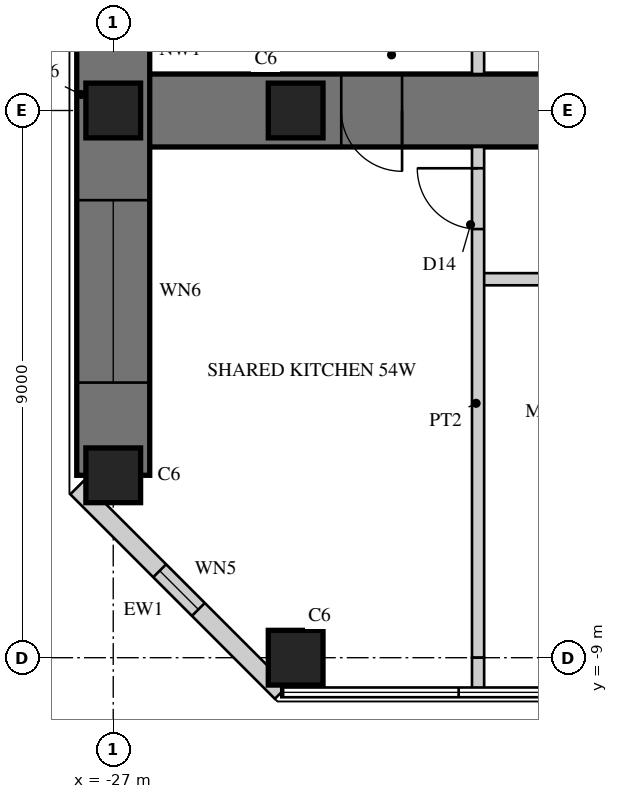
"""IFC4 building model, lengths in metres.
Left out: names, types, materials, properties, quantities, classifications, styles, units other than length and angle.
Written with IfcOpenShell. Run it as: python <this file> out.ifc"""

import sys

from ifc_helpers import new_model, si_unit, direction, frame, frame_2d, origin, origin_2d, place, context, subcontext, project, spatial, rectangle, hollow_rectangle, extrude, element, fill, save


model = new_model("IFC4")
c1 = context("Model", 3, precision=1e-05, world=origin(), true_north=direction((0.0, 1.0)))
c2 = subcontext(c1, "Body", "Model", "MODEL_VIEW")
j1 = project(units=[si_unit("LENGTHUNIT", "METRE"), si_unit("PLANEANGLEUNIT", "RADIAN")], contexts=[c1])
p1 = place(None, origin())
s1 = spatial("IfcSite", under=j1, at=p1, CompositionType="ELEMENT")
p2 = place(p1, origin())
s2 = spatial("IfcBuilding", under=s1, at=p2, CompositionType="ELEMENT")
p3 = place(p2, frame((0.0, 0.0, 213.7)))
s3 = spatial("IfcBuildingStorey", under=s2, at=p3, CompositionType="ELEMENT", Elevation=213.7)
p4 = place(p3, frame((-9.0, 0.0, 0.0), z_axis=(0.0, 0.0, 1.0), x_axis=(-1.0, 0.0, 0.0)))
e1 = element("IfcWall", 1, at=p4, inside=s3, PredefinedType="SHEAR", context=c2, shape_type="SweptSolid", body=[
    extrude(rectangle(XDim=18.0, YDim=1.2, at=frame_2d((9.0, 0.0))), origin(), (0.0, 0.0, 1.0), 3.4),
])
p5 = place(p4, frame((3.95, 0.0, 0.0)))
e2 = element("IfcOpeningElement", 2, at=p5, cuts=e1, PredefinedType="OPENING", context=c2, shape_type="SweptSolid", body=[
    extrude(rectangle(XDim=1.0, YDim=2.15, at=frame_2d((0.5, 1.075))), frame((0.0, 0.61, 0.0), z_axis=(0.0, -1.0, 0.0), x_axis=(1.0, 0.0, 0.0)), (0.0, 0.0, 1.0), 1.22),
])
p6 = place(p4, frame((6.6, 0.0, 0.0)))
e3 = element("IfcOpeningElement", 3, at=p6, cuts=e1, PredefinedType="OPENING", context=c2, shape_type="SweptSolid", body=[
    extrude(rectangle(XDim=1.0, YDim=2.15, at=frame_2d((0.5, 1.075))), frame((0.0, 0.61, 0.0), z_axis=(0.0, -1.0, 0.0), x_axis=(1.0, 0.0, 0.0)), (0.0, 0.0, 1.0), 1.22),
])
p7 = place(p4, frame((13.25, 0.0, 0.0)))
e4 = element("IfcOpeningElement", 4, at=p7, cuts=e1, PredefinedType="OPENING", context=c2, shape_type="SweptSolid", body=[
    extrude(rectangle(XDim=1.0, YDim=2.0, at=frame_2d((0.5, 1.0))), frame((0.0, 0.61, 0.0), z_axis=(0.0, -1.0, 0.0), x_axis=(1.0, 0.0, 0.0)), (0.0, 0.0, 1.0), 1.22),
])
p8 = place(p3, frame((-27.0, 6.0, 0.0), z_axis=(0.0, 0.0, 1.0), x_axis=(0.0, -1.0, 0.0)))
e5 = element("IfcWall", 5, at=p8, inside=s3, PredefinedType="SHEAR", context=c2, shape_type="SweptSolid", body=[
    extrude(rectangle(XDim=12.0, YDim=1.2, at=frame_2d((6.0, 0.0))), origin(), (0.0, 0.0, 1.0), 3.4),
])
p9 = place(p8, frame((1.525, 0.0, 0.6)))
e6 = element("IfcOpeningElement", 6, at=p9, cuts=e5, PredefinedType="OPENING", context=c2, shape_type="SweptSolid", body=[
    extrude(rectangle(XDim=3.0, YDim=2.4, at=frame_2d((1.5, 1.2))), frame((0.0, 0.61, 0.0), z_axis=(0.0, -1.0, 0.0), x_axis=(1.0, 0.0, 0.0)), (0.0, 0.0, 1.0), 1.22),
])
p10 = place(p8, frame((7.475, 0.0, 0.6)))
e7 = element("IfcOpeningElement", 7, at=p10, cuts=e5, PredefinedType="OPENING", context=c2, shape_type="SweptSolid", body=[
    extrude(rectangle(XDim=3.0, YDim=2.4, at=frame_2d((1.5, 1.2))), frame((0.0, 0.61, 0.0), z_axis=(0.0, -1.0, 0.0), x_axis=(1.0, 0.0, 0.0)), (0.0, 0.0, 1.0), 1.22),
])
for number, where, z_axis, x_axis in (
    (8, (-24.0, -9.0, 0.0), (0.0, 0.0, 1.0), (1.0, 0.0, 0.0)),
    (9, (-27.0, 0.0, 0.0), (0.0, 0.0, 1.0), (1.0, 0.0, 0.0)),
    (10, (-27.0, -6.0, 0.0), (0.0, 0.0, 1.0), (1.0, 0.0, 0.0)),
    (11, (-24.0, 0.0, 0.0), (0.0, 0.0, 1.0), (1.0, 0.0, 0.0)),
):
    element("IfcColumn", number, at=place(p3, frame(where, z_axis=z_axis, x_axis=x_axis)), inside=s3, PredefinedType="COLUMN", context=c2, shape_type="SweptSolid", body=[
        extrude(rectangle(XDim=0.9, YDim=0.9, at=origin_2d()), origin(), (0.0, 0.0, 1.0), 3.4),
    ])
p11 = place(p3, frame((-27.6, -6.206, 0.0), z_axis=(0.0, 0.0, 1.0), x_axis=(0.707106781187, -0.707106781187, 0.0)))
e12 = element("IfcWall", 12, at=p11, inside=s3, PredefinedType="SOLIDWALL", context=c2, shape_type="SweptSolid", body=[
    extrude(rectangle(XDim=4.757, YDim=0.3, at=frame_2d((2.379, 0.0))), origin(), (0.0, 0.0, 1.0), 3.15),
])
p12 = place(p11, frame((1.929, 0.0, 0.3)))
e13 = element("IfcOpeningElement", 13, at=p12, cuts=e12, PredefinedType="OPENING", context=c2, shape_type="SweptSolid", body=[
    extrude(rectangle(XDim=0.9, YDim=2.4, at=frame_2d((0.45, 1.2))), frame((0.0, 0.16, 0.0), z_axis=(0.0, -1.0, 0.0), x_axis=(1.0, 0.0, 0.0)), (0.0, 0.0, 1.0), 0.32),
])
p13 = place(p3, frame((-9.55, -2.775, 0.0), z_axis=(0.0, 0.0, 1.0), x_axis=(-1.0, 0.0, 0.0)))
e14 = element("IfcWall", 14, at=p13, inside=s3, PredefinedType="SOLIDWALL", context=c2, shape_type="SweptSolid", body=[
    extrude(rectangle(XDim=11.45, YDim=0.2, at=frame_2d((5.725, 0.0))), origin(), (0.0, 0.0, 1.0), 3.15),
])
p14 = place(p13, frame((3.4, 0.0, 0.0)))
e15 = element("IfcOpeningElement", 15, at=p14, cuts=e14, PredefinedType="OPENING", context=c2, shape_type="SweptSolid", body=[
    extrude(rectangle(XDim=1.0, YDim=2.15, at=frame_2d((0.5, 1.075))), frame((0.0, 0.11, 0.0), z_axis=(0.0, -1.0, 0.0), x_axis=(1.0, 0.0, 0.0)), (0.0, 0.0, 1.0), 0.22),
])
p15 = place(p13, frame((6.65, 0.0, 0.0)))
e16 = element("IfcOpeningElement", 16, at=p15, cuts=e14, PredefinedType="OPENING", context=c2, shape_type="SweptSolid", body=[
    extrude(rectangle(XDim=1.0, YDim=2.2, at=frame_2d((0.5, 1.1))), frame((0.0, 0.11, 0.0), z_axis=(0.0, -1.0, 0.0), x_axis=(1.0, 0.0, 0.0)), (0.0, 0.0, 1.0), 0.22),
])
p16 = place(p3, frame((-21.0, 9.0, 0.0), z_axis=(0.0, 0.0, 1.0), x_axis=(0.0, -1.0, 0.0)))
e17 = element("IfcWall", 17, at=p16, inside=s3, PredefinedType="SOLIDWALL", context=c2, shape_type="SweptSolid", body=[
    extrude(rectangle(XDim=8.4, YDim=0.2, at=frame_2d((4.2, 0.0))), origin(), (0.0, 0.0, 1.0), 2.3),
])
p17 = place(p3, frame((-21.0, -0.6, 0.0), z_axis=(0.0, 0.0, 1.0), x_axis=(0.0, -1.0, 0.0)))
e18 = element("IfcWall", 18, at=p17, inside=s3, PredefinedType="SOLIDWALL", context=c2, shape_type="SweptSolid", body=[
    extrude(rectangle(XDim=8.4, YDim=0.2, at=frame_2d((4.2, 0.0))), origin(), (0.0, 0.0, 1.0), 2.3),
])
p18 = place(p17, frame((0.35, 0.0, 0.0)))
e19 = element("IfcOpeningElement", 19, at=p18, cuts=e18, PredefinedType="OPENING", context=c2, shape_type="SweptSolid", body=[
    extrude(rectangle(XDim=1.0, YDim=2.2, at=frame_2d((0.5, 1.1))), frame((0.0, 0.11, 0.0), z_axis=(0.0, -1.0, 0.0), x_axis=(1.0, 0.0, 0.0)), (0.0, 0.0, 1.0), 0.22),
])
p19 = place(p3, frame((-21.0, -9.0, 0.0), z_axis=(0.0, 0.0, 1.0), x_axis=(0.0, -1.0, 0.0)))
e20 = element("IfcWall", 20, at=p19, inside=s3, PredefinedType="SOLIDWALL", context=c2, shape_type="SweptSolid", body=[
    extrude(rectangle(XDim=0.53, YDim=0.2, at=frame_2d((0.265, 0.0))), origin(), (0.0, 0.0, 1.0), 3.15),
])
p20 = place(p10, origin())
e21 = element("IfcWindow", 21, at=p20, inside=s3, PartitioningType="SINGLE_PANEL", PredefinedType="WINDOW", context=c2, shape_type="SweptSolid", body=[
    extrude(hollow_rectangle(XDim=3.0, YDim=2.4, WallThickness=0.06, at=frame_2d((1.5, 1.2))), frame((0.0, 0.03, 0.0), z_axis=(0.0, -1.0, 0.0), x_axis=(1.0, 0.0, 0.0)), (0.0, 0.0, 1.0), 0.06),
    extrude(rectangle(XDim=2.879, YDim=2.279, at=frame_2d((1.5, 1.2))), frame((0.0, 0.03, 0.0), z_axis=(0.0, -1.0, 0.0), x_axis=(1.0, 0.0, 0.0)), (0.0, 0.0, 1.0), 0.06),
])
fill(e7, e21)
p21 = place(p12, origin())
e22 = element("IfcWindow", 22, at=p21, inside=s3, PartitioningType="SINGLE_PANEL", PredefinedType="WINDOW", context=c2, shape_type="SweptSolid", body=[
    extrude(hollow_rectangle(XDim=0.9, YDim=2.4, WallThickness=0.06, at=frame_2d((0.45, 1.2))), frame((0.0, 0.03, 0.0), z_axis=(0.0, -1.0, 0.0), x_axis=(1.0, 0.0, 0.0)), (0.0, 0.0, 1.0), 0.06),
    extrude(rectangle(XDim=0.779, YDim=2.279, at=frame_2d((0.45, 1.2))), frame((0.0, 0.03, 0.0), z_axis=(0.0, -1.0, 0.0), x_axis=(1.0, 0.0, 0.0)), (0.0, 0.0, 1.0), 0.06),
])
fill(e13, e22)
p22 = place(p18, frame((1.0, 0.0, 0.0), z_axis=(0.0, 0.0, 1.0), x_axis=(-1.0, 0.0, 0.0)))
e23 = element("IfcDoor", 23, at=p22, inside=s3, OperationType="SINGLE_SWING_RIGHT", PredefinedType="DOOR", context=c2, shape_type="SweptSolid", body=[
    extrude(rectangle(XDim=1.0, YDim=2.2, at=frame_2d((0.5, 1.1))), frame((0.0, 0.025, 0.0), z_axis=(0.0, -1.0, 0.0), x_axis=(1.0, 0.0, 0.0)), (0.0, 0.0, 1.0), 0.05),
])
fill(e19, e23)
p23 = place(p7, origin())
e24 = element("IfcDoor", 24, at=p23, inside=s3, OperationType="SINGLE_SWING_LEFT", PredefinedType="DOOR", context=c2, shape_type="SweptSolid", body=[
    extrude(rectangle(XDim=1.0, YDim=2.0, at=frame_2d((0.5, 1.0))), frame((0.0, 0.025, 0.0), z_axis=(0.0, -1.0, 0.0), x_axis=(1.0, 0.0, 0.0)), (0.0, 0.0, 1.0), 0.05),
])
fill(e4, e24)
save(model, sys.argv[1])
